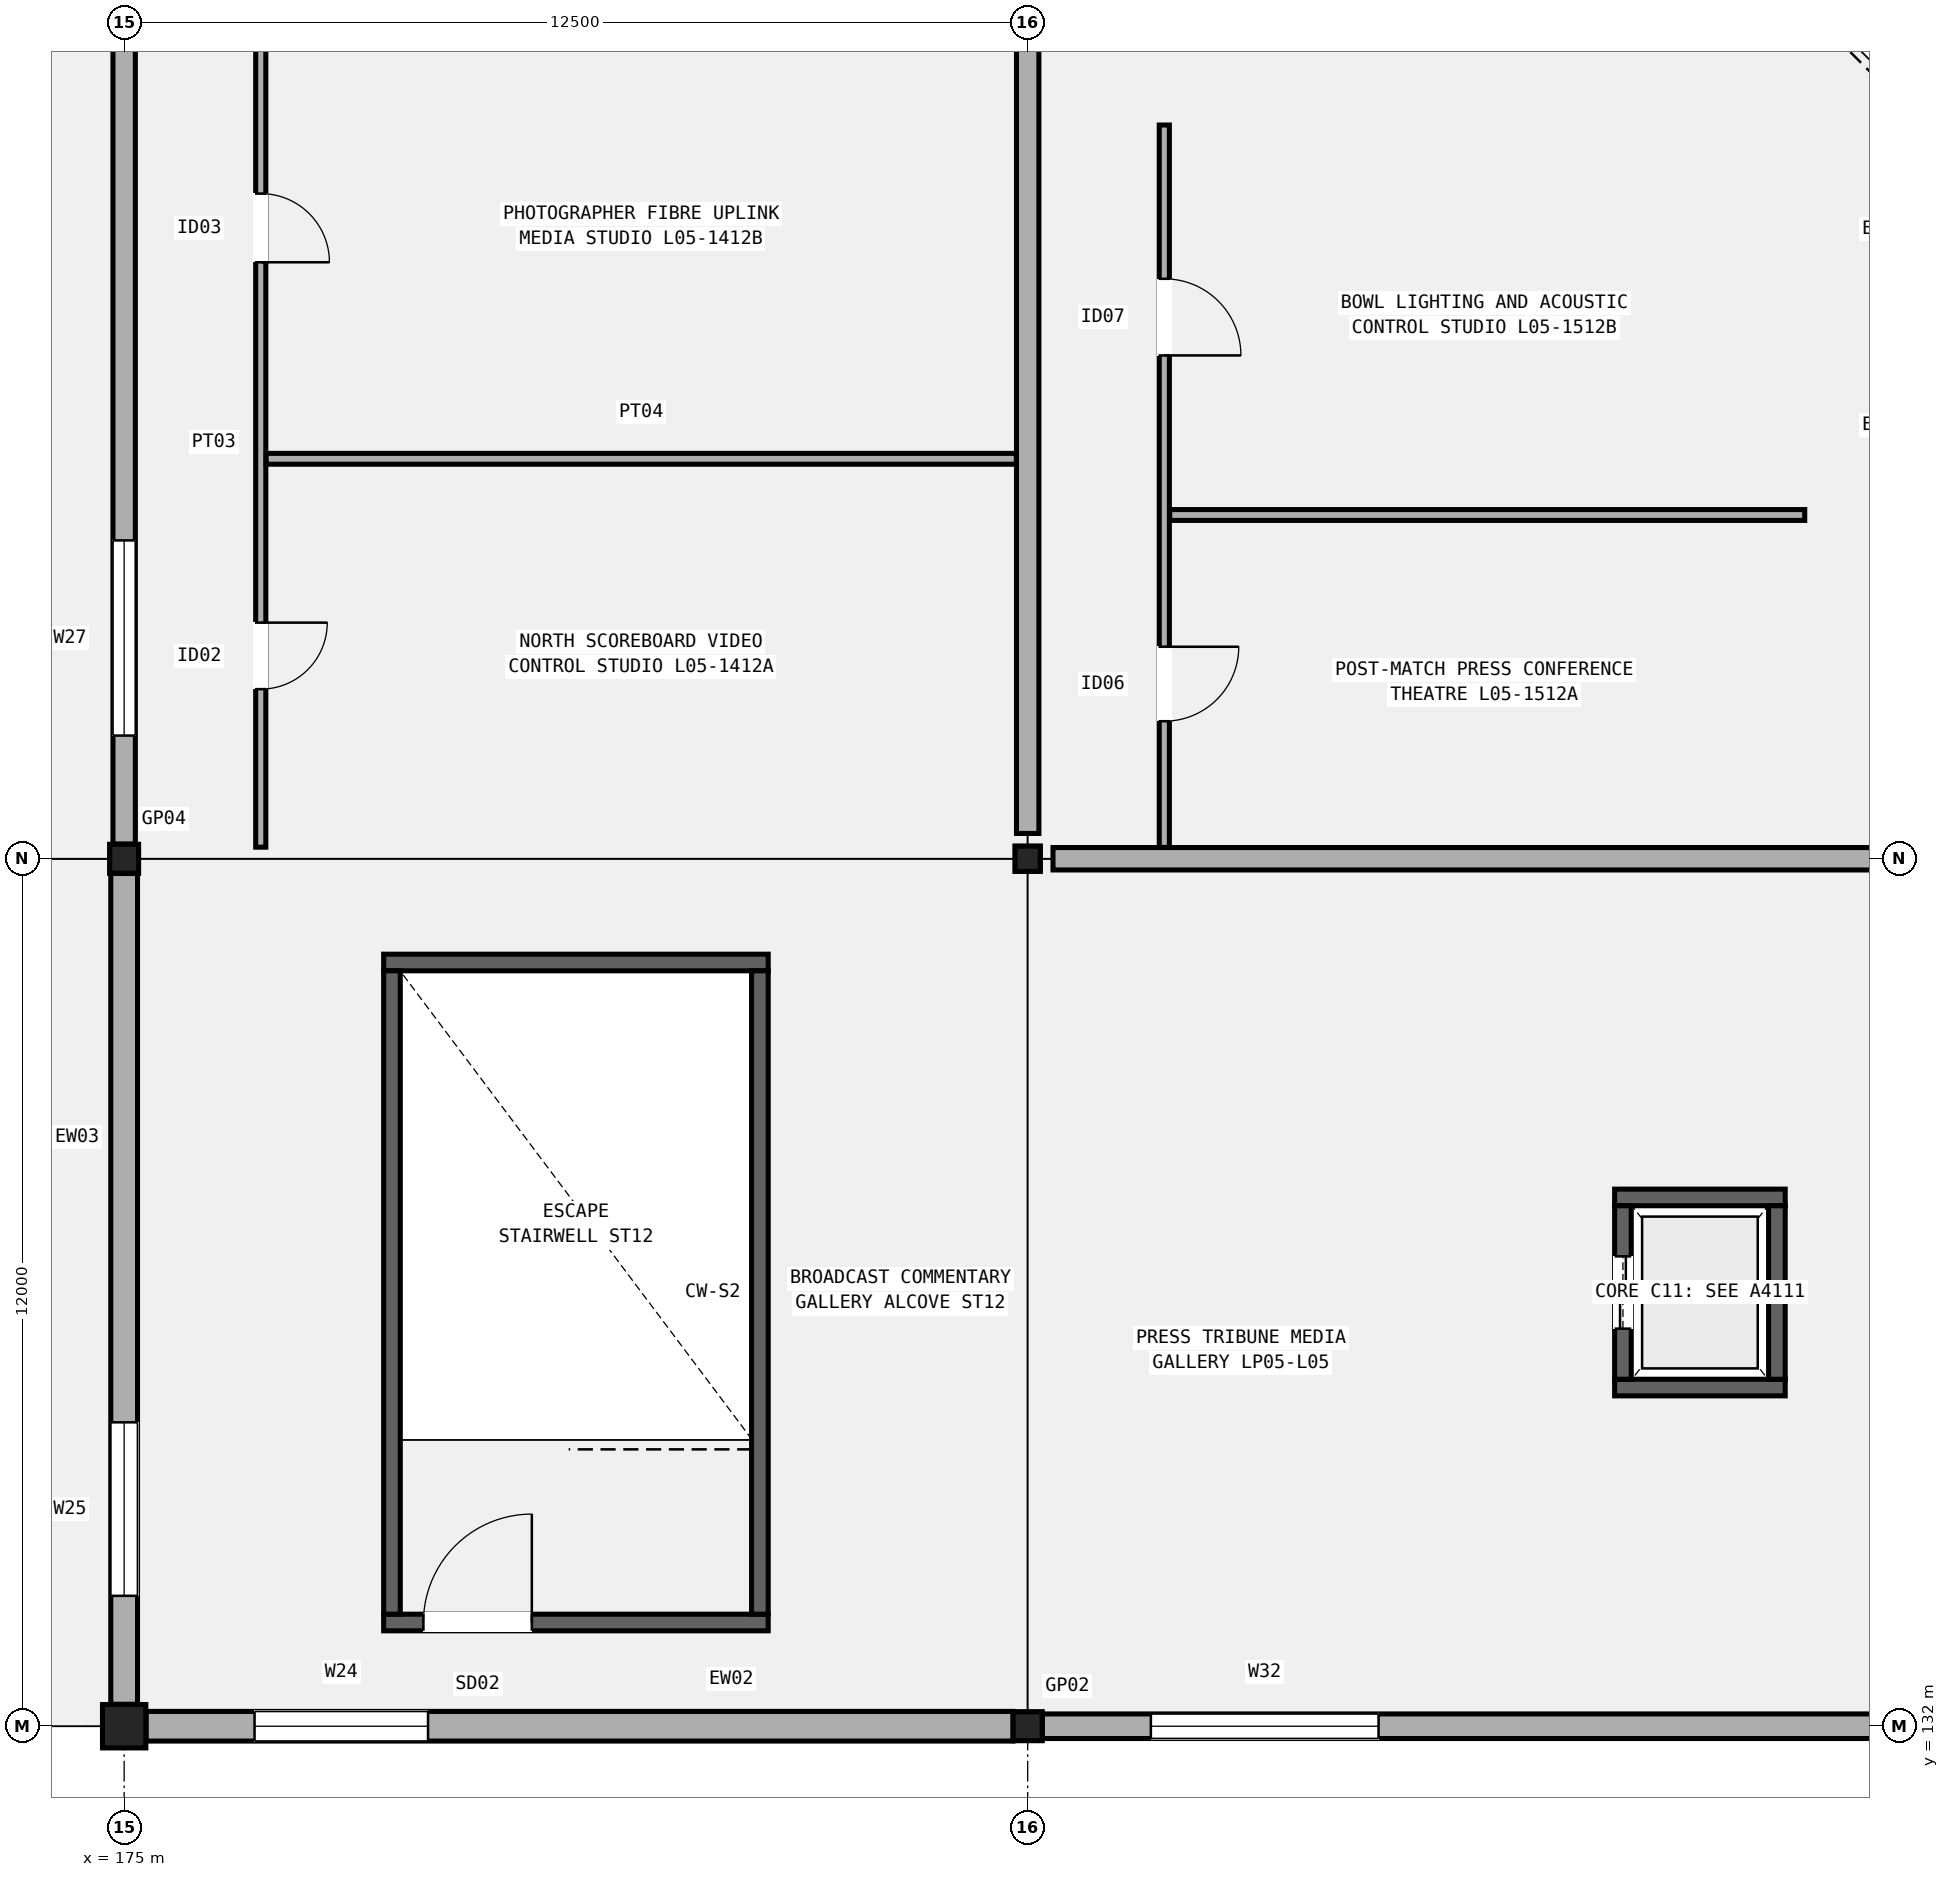
"""IFC4 building model, lengths in metres.
Left out: names, types, materials, properties, quantities, classifications, styles, units other than length and angle.
Written with IfcOpenShell. Run it as: python <this file> out.ifc"""

import sys

from ifc_helpers import new_model, si_unit, direction, frame, frame_2d, origin, origin_2d, place, context, subcontext, project, spatial, rectangle, hollow_rectangle, extrude, element, fill, save


model = new_model("IFC4")
c1 = context("Model", 3, precision=1e-05, world=origin(), true_north=direction((0.0, 1.0)))
c2 = subcontext(c1, "Body", "Model", "MODEL_VIEW")
j1 = project(units=[si_unit("LENGTHUNIT", "METRE"), si_unit("PLANEANGLEUNIT", "RADIAN")], contexts=[c1])
p1 = place(None, origin())
s1 = spatial("IfcSite", under=j1, at=p1, CompositionType="ELEMENT")
p2 = place(p1, origin())
s2 = spatial("IfcBuilding", under=s1, at=p2, CompositionType="ELEMENT")
p3 = place(p2, frame((0.0, 0.0, 25.8)))
s3 = spatial("IfcBuildingStorey", under=s2, at=p3, CompositionType="ELEMENT", Elevation=25.8)
p4 = place(p3, frame((175.0, 132.0, 0.0), z_axis=(0.0, 0.0, 1.0), x_axis=(1.0, 0.0, 0.0)))
e1 = element("IfcColumn", 1, at=p4, inside=s3, PredefinedType="COLUMN", context=c2, shape_type="SweptSolid", body=[
    extrude(rectangle(XDim=0.6, YDim=0.6, at=origin_2d()), origin(), (0.0, 0.0, 1.0), 5.4),
])
for number, where, z_axis, x_axis in (
    (2, (175.0, 144.0, 0.0), (0.0, 0.0, 1.0), (1.0, 0.0, 0.0)),
    (3, (187.5, 132.0, 0.0), (0.0, 0.0, 1.0), (1.0, 0.0, 0.0)),
):
    element("IfcColumn", number, at=place(p3, frame(where, z_axis=z_axis, x_axis=x_axis)), inside=s3, PredefinedType="COLUMN", context=c2, shape_type="SweptSolid", body=[
        extrude(hollow_rectangle(XDim=0.4, YDim=0.4, WallThickness=0.016, InnerFilletRadius=0.016, OuterFilletRadius=0.032, at=origin_2d()), origin(), (0.0, 0.0, 1.0), 5.4),
    ])
p5 = place(p3, frame((187.5, 144.0, 0.0), z_axis=(0.0, 0.0, 1.0), x_axis=(1.0, 0.0, 0.0)))
e4 = element("IfcColumn", 4, at=p5, inside=s3, PredefinedType="COLUMN", context=c2, shape_type="SweptSolid", body=[
    extrude(hollow_rectangle(XDim=0.35, YDim=0.35, WallThickness=0.016, InnerFilletRadius=0.016, OuterFilletRadius=0.032, at=origin_2d()), origin(), (0.0, 0.0, 1.0), 5.4),
])
p6 = place(p3, frame((175.304, 132.0, 0.0), z_axis=(0.0, 0.0, 1.0), x_axis=(1.0, 0.0, 0.0)))
e5 = element("IfcWall", 5, at=p6, inside=s3, PredefinedType="SOLIDWALL", context=c2, shape_type="SweptSolid", body=[
    extrude(rectangle(XDim=11.992, YDim=0.41, at=frame_2d((5.996, 0.0))), origin(), (0.0, 0.0, 1.0), 4.44),
])
p7 = place(p6, frame((1.5, 0.0, 0.95)))
e6 = element("IfcOpeningElement", 6, at=p7, cuts=e5, PredefinedType="OPENING", context=c2, shape_type="SweptSolid", body=[
    extrude(rectangle(XDim=2.4, YDim=2.05, at=frame_2d((1.2, 1.025))), frame((0.0, 0.215, 0.0), z_axis=(0.0, -1.0, 0.0), x_axis=(1.0, 0.0, 0.0)), (0.0, 0.0, 1.0), 0.43),
])
p8 = place(p3, frame((175.0, 132.304, 0.0), z_axis=(0.0, 0.0, 1.0), x_axis=(0.0, 1.0, 0.0)))
e7 = element("IfcWall", 7, at=p8, inside=s3, PredefinedType="SOLIDWALL", context=c2, shape_type="SweptSolid", body=[
    extrude(rectangle(XDim=11.492, YDim=0.37, at=frame_2d((5.746, 0.0))), origin(), (0.0, 0.0, 1.0), 4.13),
])
p9 = place(p8, frame((1.5, 0.0, 0.95)))
e8 = element("IfcOpeningElement", 8, at=p9, cuts=e7, PredefinedType="OPENING", context=c2, shape_type="SweptSolid", body=[
    extrude(rectangle(XDim=2.4, YDim=2.45, at=frame_2d((1.2, 1.225))), frame((0.0, 0.195, 0.0), z_axis=(0.0, -1.0, 0.0), x_axis=(1.0, 0.0, 0.0)), (0.0, 0.0, 1.0), 0.39),
])
p10 = place(p3, frame((175.0, 144.204, 0.0), z_axis=(0.0, 0.0, 1.0), x_axis=(0.0, 1.0, 0.0)))
e9 = element("IfcWall", 9, at=p10, inside=s3, PredefinedType="SOLIDWALL", context=c2, shape_type="SweptSolid", body=[
    extrude(rectangle(XDim=11.617, YDim=0.31, at=frame_2d((5.809, 0.0))), origin(), (0.0, 0.0, 1.0), 4.452),
])
p11 = place(p10, frame((1.5, 0.0, 0.95)))
e10 = element("IfcOpeningElement", 10, at=p11, cuts=e9, PredefinedType="OPENING", context=c2, shape_type="SweptSolid", body=[
    extrude(rectangle(XDim=2.7, YDim=1.75, at=frame_2d((1.35, 0.875))), frame((0.0, 0.165, 0.0), z_axis=(0.0, -1.0, 0.0), x_axis=(1.0, 0.0, 0.0)), (0.0, 0.0, 1.0), 0.33),
])
p12 = place(p3, frame((187.704, 132.0, 0.0), z_axis=(0.0, 0.0, 1.0), x_axis=(1.0, 0.0, 0.0)))
e11 = element("IfcWall", 11, at=p12, inside=s3, PredefinedType="SOLIDWALL", context=c2, shape_type="SweptSolid", body=[
    extrude(rectangle(XDim=12.117, YDim=0.34, at=frame_2d((6.059, 0.0))), origin(), (0.0, 0.0, 1.0), 4.452),
])
p13 = place(p12, frame((1.5, 0.0, 0.95)))
e12 = element("IfcOpeningElement", 12, at=p13, cuts=e11, PredefinedType="OPENING", context=c2, shape_type="SweptSolid", body=[
    extrude(rectangle(XDim=3.15, YDim=1.9, at=frame_2d((1.575, 0.95))), frame((0.0, 0.18, 0.0), z_axis=(0.0, -1.0, 0.0), x_axis=(1.0, 0.0, 0.0)), (0.0, 0.0, 1.0), 0.36),
])
p14 = place(p3, frame((187.85, 144.0, 5.4), z_axis=(0.0, 0.0, 1.0), x_axis=(1.0, 0.0, 0.0)))
e13 = element("IfcWall", 13, at=p14, inside=s3, PredefinedType="SOLIDWALL", context=c2, shape_type="SweptSolid", body=[
    extrude(rectangle(XDim=11.8, YDim=0.31, at=frame_2d((5.9, 0.0))), origin(), (0.0, 0.0, 1.0), 0.58),
])
p15 = place(p3, frame((187.5, 144.35, 5.4), z_axis=(0.0, 0.0, 1.0), x_axis=(0.0, 1.0, 0.0)))
e14 = element("IfcWall", 14, at=p15, inside=s3, PredefinedType="SOLIDWALL", context=c2, shape_type="SweptSolid", body=[
    extrude(rectangle(XDim=11.3, YDim=0.31, at=frame_2d((5.65, 0.0))), origin(), (0.0, 0.0, 1.0), 0.58),
])
p16 = place(p3, frame((178.59, 133.435, 0.0), z_axis=(0.0, 0.0, 1.0), x_axis=(1.0, 0.0, 0.0)))
e15 = element("IfcWall", 15, at=p16, inside=s3, PredefinedType="SHEAR", context=c2, shape_type="SweptSolid", body=[
    extrude(rectangle(XDim=5.32, YDim=0.23, at=frame_2d((2.66, 0.0))), origin(), (0.0, 0.0, 1.0), 5.04),
])
p17 = place(p16, frame((0.55, 0.0, 0.0)))
e16 = element("IfcOpeningElement", 16, at=p17, cuts=e15, PredefinedType="OPENING", context=c2, shape_type="SweptSolid", body=[
    extrude(rectangle(XDim=1.5, YDim=2.2, at=frame_2d((0.75, 1.1))), frame((0.0, 0.125, 0.0), z_axis=(0.0, -1.0, 0.0), x_axis=(1.0, 0.0, 0.0)), (0.0, 0.0, 1.0), 0.25),
])
p18 = place(p3, frame((178.59, 142.565, 0.0), z_axis=(0.0, 0.0, 1.0), x_axis=(1.0, 0.0, 0.0)))
e17 = element("IfcWall", 17, at=p18, inside=s3, PredefinedType="SHEAR", context=c2, shape_type="SweptSolid", body=[
    extrude(rectangle(XDim=5.32, YDim=0.23, at=frame_2d((2.66, 0.0))), origin(), (0.0, 0.0, 1.0), 5.04),
])
for number, where, z_axis, x_axis in (
    (18, (178.705, 133.55, 0.0), (0.0, 0.0, 1.0), (0.0, 1.0, 0.0)),
    (19, (183.795, 133.55, 0.0), (0.0, 0.0, 1.0), (0.0, 1.0, 0.0)),
):
    element("IfcWall", number, at=place(p3, frame(where, z_axis=z_axis, x_axis=x_axis)), inside=s3, PredefinedType="SHEAR", context=c2, shape_type="SweptSolid", body=[
        extrude(rectangle(XDim=8.9, YDim=0.23, at=frame_2d((4.45, 0.0))), origin(), (0.0, 0.0, 1.0), 5.04),
    ])
for number, where, z_axis, x_axis in (
    (20, (195.62, 136.685, 0.0), (0.0, 0.0, 1.0), (1.0, 0.0, 0.0)),
    (21, (195.62, 139.315, 0.0), (0.0, 0.0, 1.0), (1.0, 0.0, 0.0)),
):
    element("IfcWall", number, at=place(p3, frame(where, z_axis=z_axis, x_axis=x_axis)), inside=s3, PredefinedType="SHEAR", context=c2, shape_type="SweptSolid", body=[
        extrude(rectangle(XDim=2.36, YDim=0.23, at=frame_2d((1.18, 0.0))), origin(), (0.0, 0.0, 1.0), 5.04),
    ])
p19 = place(p3, frame((195.735, 136.8, 0.0), z_axis=(0.0, 0.0, 1.0), x_axis=(0.0, 1.0, 0.0)))
e22 = element("IfcWall", 22, at=p19, inside=s3, PredefinedType="SHEAR", context=c2, shape_type="SweptSolid", body=[
    extrude(rectangle(XDim=2.4, YDim=0.23, at=frame_2d((1.2, 0.0))), origin(), (0.0, 0.0, 1.0), 5.04),
])
p20 = place(p19, frame((0.7, 0.0, 0.0)))
e23 = element("IfcOpeningElement", 23, at=p20, cuts=e22, PredefinedType="OPENING", context=c2, shape_type="SweptSolid", body=[
    extrude(rectangle(XDim=1.0, YDim=2.15, at=frame_2d((0.5, 1.075))), frame((0.0, 0.125, 0.0), z_axis=(0.0, -1.0, 0.0), x_axis=(1.0, 0.0, 0.0)), (0.0, 0.0, 1.0), 0.25),
])
p21 = place(p3, frame((197.865, 136.8, 0.0), z_axis=(0.0, 0.0, 1.0), x_axis=(0.0, 1.0, 0.0)))
e24 = element("IfcWall", 24, at=p21, inside=s3, PredefinedType="SHEAR", context=c2, shape_type="SweptSolid", body=[
    extrude(rectangle(XDim=2.4, YDim=0.23, at=frame_2d((1.2, 0.0))), origin(), (0.0, 0.0, 1.0), 5.04),
])
p22 = place(p3, frame((176.89, 144.16, 0.0), z_axis=(0.0, 0.0, 1.0), x_axis=(0.0, 1.0, 0.0)))
e25 = element("IfcWall", 25, at=p22, inside=s3, PredefinedType="PARTITIONING", context=c2, shape_type="SweptSolid", body=[
    extrude(rectangle(XDim=11.668, YDim=0.14, at=frame_2d((5.834, 0.0))), origin(), (0.0, 0.0, 1.0), 4.35),
])
p23 = place(p22, frame((3.106, 0.0, 0.0), z_axis=(0.0, 0.0, 1.0), x_axis=(-1.0, 0.0, 0.0)))
e26 = element("IfcOpeningElement", 26, at=p23, cuts=e25, PredefinedType="OPENING", context=c2, shape_type="SweptSolid", body=[
    extrude(rectangle(XDim=0.92, YDim=2.1, at=frame_2d((0.46, 1.05))), frame((0.0, 0.08, 0.0), z_axis=(0.0, -1.0, 0.0), x_axis=(1.0, 0.0, 0.0)), (0.0, 0.0, 1.0), 0.16),
])
p24 = place(p22, frame((9.041, 0.0, 0.0), z_axis=(0.0, 0.0, 1.0), x_axis=(-1.0, 0.0, 0.0)))
e27 = element("IfcOpeningElement", 27, at=p24, cuts=e25, PredefinedType="OPENING", context=c2, shape_type="SweptSolid", body=[
    extrude(rectangle(XDim=0.95, YDim=2.12, at=frame_2d((0.475, 1.06))), frame((0.0, 0.08, 0.0), z_axis=(0.0, -1.0, 0.0), x_axis=(1.0, 0.0, 0.0)), (0.0, 0.0, 1.0), 0.16),
])
p25 = place(p3, frame((176.965, 149.533, 0.0), z_axis=(0.0, 0.0, 1.0), x_axis=(1.0, 0.0, 0.0)))
e28 = element("IfcWall", 28, at=p25, inside=s3, PredefinedType="PARTITIONING", context=c2, shape_type="SweptSolid", body=[
    extrude(rectangle(XDim=10.378, YDim=0.15, at=frame_2d((5.189, 0.0))), origin(), (0.0, 0.0, 1.0), 4.35),
])
p26 = place(p3, frame((189.39, 144.157, 0.0), z_axis=(0.0, 0.0, 1.0), x_axis=(0.0, 1.0, 0.0)))
e29 = element("IfcWall", 29, at=p26, inside=s3, PredefinedType="PARTITIONING", context=c2, shape_type="SweptSolid", body=[
    extrude(rectangle(XDim=9.993, YDim=0.14, at=frame_2d((4.997, 0.0))), origin(), (0.0, 0.0, 1.0), 4.35),
])
p27 = place(p26, frame((2.776, 0.0, 0.0), z_axis=(0.0, 0.0, 1.0), x_axis=(-1.0, 0.0, 0.0)))
e30 = element("IfcOpeningElement", 30, at=p27, cuts=e29, PredefinedType="OPENING", context=c2, shape_type="SweptSolid", body=[
    extrude(rectangle(XDim=1.03, YDim=2.12, at=frame_2d((0.515, 1.06))), frame((0.0, 0.08, 0.0), z_axis=(0.0, -1.0, 0.0), x_axis=(1.0, 0.0, 0.0)), (0.0, 0.0, 1.0), 0.16),
])
p28 = place(p26, frame((7.866, 0.0, 0.0), z_axis=(0.0, 0.0, 1.0), x_axis=(-1.0, 0.0, 0.0)))
e31 = element("IfcOpeningElement", 31, at=p28, cuts=e29, PredefinedType="OPENING", context=c2, shape_type="SweptSolid", body=[
    extrude(rectangle(XDim=1.06, YDim=2.15, at=frame_2d((0.53, 1.075))), frame((0.0, 0.08, 0.0), z_axis=(0.0, -1.0, 0.0), x_axis=(1.0, 0.0, 0.0)), (0.0, 0.0, 1.0), 0.16),
])
p29 = place(p3, frame((189.465, 148.755, 0.0), z_axis=(0.0, 0.0, 1.0), x_axis=(1.0, 0.0, 0.0)))
e32 = element("IfcWall", 32, at=p29, inside=s3, PredefinedType="PARTITIONING", context=c2, shape_type="SweptSolid", body=[
    extrude(rectangle(XDim=8.785, YDim=0.15, at=frame_2d((4.393, 0.0))), origin(), (0.0, 0.0, 1.0), 4.35),
])
p30 = place(p7, origin())
e33 = element("IfcWindow", 33, at=p30, inside=s3, PartitioningType="SINGLE_PANEL", PredefinedType="WINDOW", context=c2, shape_type="SweptSolid", body=[
    extrude(rectangle(XDim=2.4, YDim=2.05, at=frame_2d((1.2, 1.025))), frame((0.0, 0.03, 0.0), z_axis=(0.0, -1.0, 0.0), x_axis=(1.0, 0.0, 0.0)), (0.0, 0.0, 1.0), 0.06),
])
fill(e6, e33)
p31 = place(p9, origin())
e34 = element("IfcWindow", 34, at=p31, inside=s3, PartitioningType="SINGLE_PANEL", PredefinedType="WINDOW", context=c2, shape_type="SweptSolid", body=[
    extrude(rectangle(XDim=2.4, YDim=2.45, at=frame_2d((1.2, 1.225))), frame((0.0, 0.03, 0.0), z_axis=(0.0, -1.0, 0.0), x_axis=(1.0, 0.0, 0.0)), (0.0, 0.0, 1.0), 0.06),
])
fill(e8, e34)
p32 = place(p11, origin())
e35 = element("IfcWindow", 35, at=p32, inside=s3, PartitioningType="SINGLE_PANEL", PredefinedType="WINDOW", context=c2, shape_type="SweptSolid", body=[
    extrude(rectangle(XDim=2.7, YDim=1.75, at=frame_2d((1.35, 0.875))), frame((0.0, 0.03, 0.0), z_axis=(0.0, -1.0, 0.0), x_axis=(1.0, 0.0, 0.0)), (0.0, 0.0, 1.0), 0.06),
])
fill(e10, e35)
p33 = place(p13, origin())
e36 = element("IfcWindow", 36, at=p33, inside=s3, PartitioningType="SINGLE_PANEL", PredefinedType="WINDOW", context=c2, shape_type="SweptSolid", body=[
    extrude(rectangle(XDim=3.15, YDim=1.9, at=frame_2d((1.575, 0.95))), frame((0.0, 0.03, 0.0), z_axis=(0.0, -1.0, 0.0), x_axis=(1.0, 0.0, 0.0)), (0.0, 0.0, 1.0), 0.06),
])
fill(e12, e36)
p34 = place(p17, origin())
e37 = element("IfcDoor", 37, at=p34, inside=s3, OperationType="SINGLE_SWING_RIGHT", PredefinedType="DOOR", context=c2, shape_type="SweptSolid", body=[
    extrude(rectangle(XDim=1.5, YDim=2.2, at=frame_2d((0.75, 1.1))), frame((0.0, 0.025, 0.0), z_axis=(0.0, -1.0, 0.0), x_axis=(1.0, 0.0, 0.0)), (0.0, 0.0, 1.0), 0.05),
])
fill(e16, e37)
p35 = place(p20, origin())
e38 = element("IfcDoor", 38, at=p35, inside=s3, OperationType="DOUBLE_DOOR_SLIDING", PredefinedType="DOOR", context=c2, shape_type="SweptSolid", body=[
    extrude(rectangle(XDim=1.0, YDim=2.15, at=frame_2d((0.5, 1.075))), frame((0.0, 0.025, 0.0), z_axis=(0.0, -1.0, 0.0), x_axis=(1.0, 0.0, 0.0)), (0.0, 0.0, 1.0), 0.05),
])
fill(e23, e38)
p36 = place(p23, origin())
e39 = element("IfcDoor", 39, at=p36, inside=s3, OperationType="SINGLE_SWING_LEFT", PredefinedType="DOOR", context=c2, shape_type="SweptSolid", body=[
    extrude(rectangle(XDim=0.92, YDim=2.1, at=frame_2d((0.46, 1.05))), frame((0.0, 0.025, 0.0), z_axis=(0.0, -1.0, 0.0), x_axis=(1.0, 0.0, 0.0)), (0.0, 0.0, 1.0), 0.05),
])
fill(e26, e39)
p37 = place(p24, origin())
e40 = element("IfcDoor", 40, at=p37, inside=s3, OperationType="SINGLE_SWING_RIGHT", PredefinedType="DOOR", context=c2, shape_type="SweptSolid", body=[
    extrude(rectangle(XDim=0.95, YDim=2.12, at=frame_2d((0.475, 1.06))), frame((0.0, 0.025, 0.0), z_axis=(0.0, -1.0, 0.0), x_axis=(1.0, 0.0, 0.0)), (0.0, 0.0, 1.0), 0.05),
])
fill(e27, e40)
p38 = place(p27, origin())
e41 = element("IfcDoor", 41, at=p38, inside=s3, OperationType="SINGLE_SWING_LEFT", PredefinedType="DOOR", context=c2, shape_type="SweptSolid", body=[
    extrude(rectangle(XDim=1.03, YDim=2.12, at=frame_2d((0.515, 1.06))), frame((0.0, 0.025, 0.0), z_axis=(0.0, -1.0, 0.0), x_axis=(1.0, 0.0, 0.0)), (0.0, 0.0, 1.0), 0.05),
])
fill(e30, e41)
p39 = place(p28, origin())
e42 = element("IfcDoor", 42, at=p39, inside=s3, OperationType="SINGLE_SWING_RIGHT", PredefinedType="DOOR", context=c2, shape_type="SweptSolid", body=[
    extrude(rectangle(XDim=1.06, YDim=2.15, at=frame_2d((0.53, 1.075))), frame((0.0, 0.025, 0.0), z_axis=(0.0, -1.0, 0.0), x_axis=(1.0, 0.0, 0.0)), (0.0, 0.0, 1.0), 0.05),
])
fill(e31, e42)
save(model, sys.argv[1])
